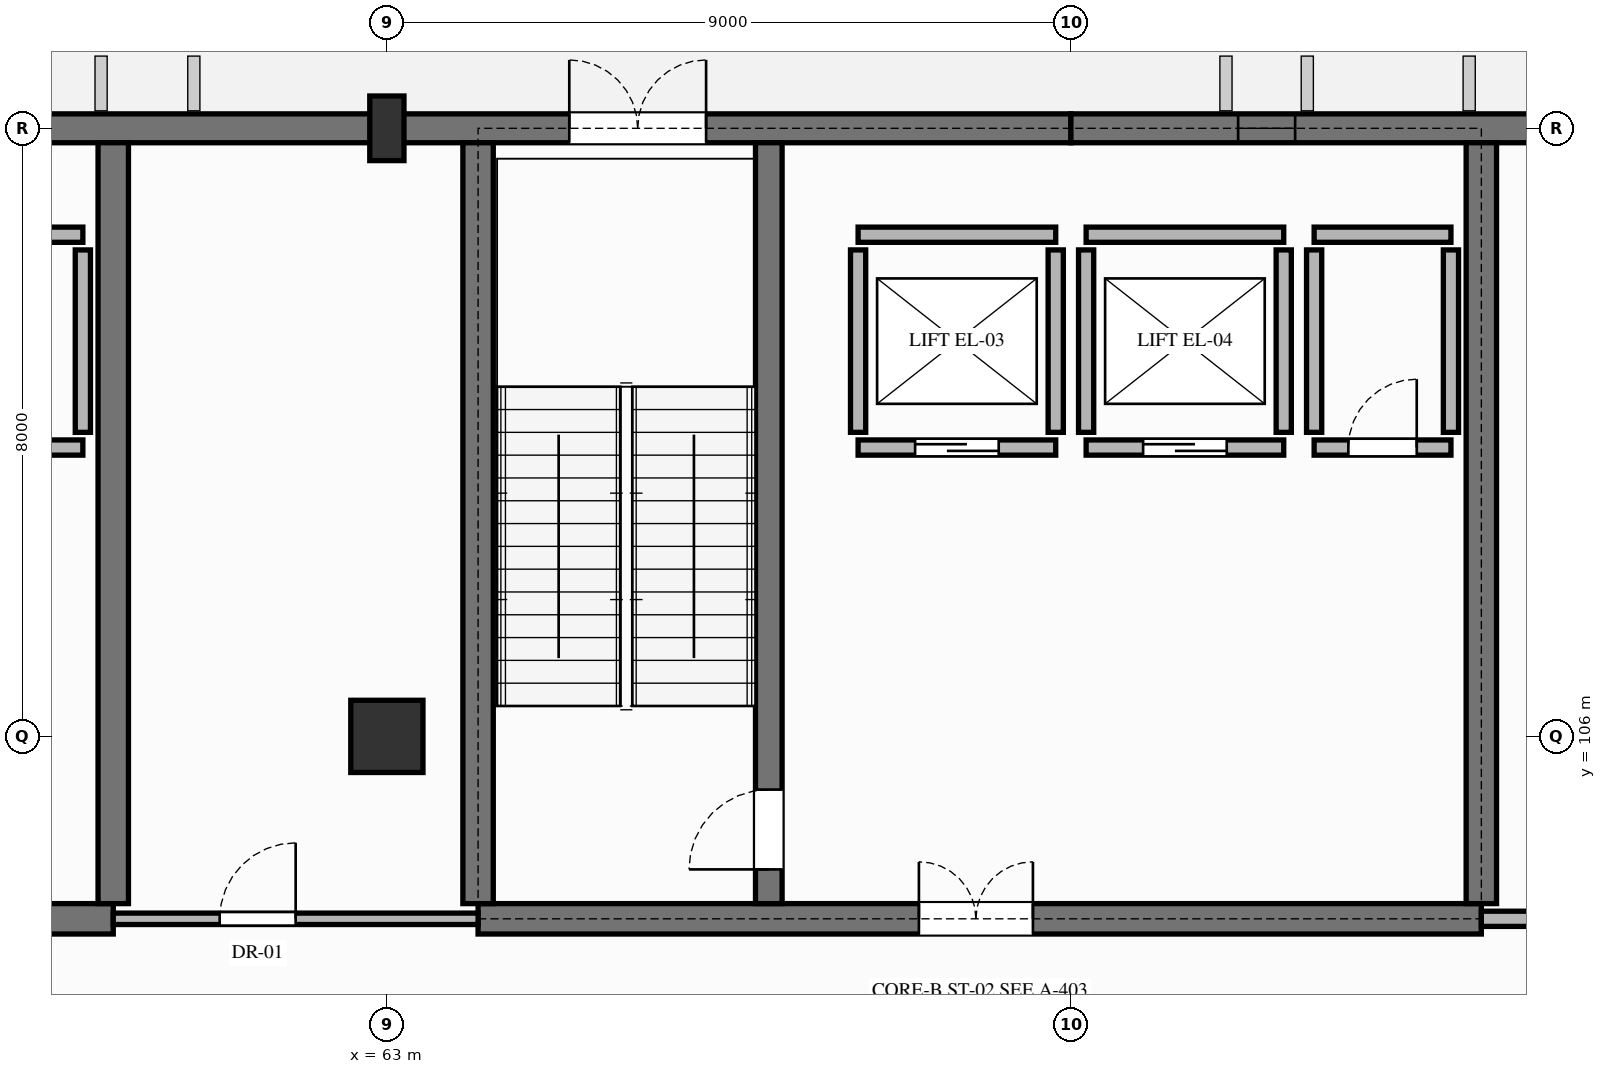
"""IFC4 building model, lengths in metres.
Left out: names, types, materials, properties, quantities, classifications, styles, units other than length and angle.
Written with IfcOpenShell. Run it as: python <this file> out.ifc"""

import sys

from ifc_helpers import new_model, si_unit, direction, frame, frame_2d, origin, origin_2d, place, context, subcontext, project, spatial, rectangle, extrude, element, fill, save


model = new_model("IFC4")
c1 = context("Model", 3, precision=1e-05, world=origin(), true_north=direction((0.0, 1.0)))
c2 = subcontext(c1, "Body", "Model", "MODEL_VIEW")
j1 = project(units=[si_unit("LENGTHUNIT", "METRE"), si_unit("PLANEANGLEUNIT", "RADIAN")], contexts=[c1])
p1 = place(None, origin())
s1 = spatial("IfcSite", under=j1, at=p1, CompositionType="ELEMENT")
p2 = place(p1, origin())
s2 = spatial("IfcBuilding", under=s1, at=p2, CompositionType="ELEMENT")
p3 = place(p2, origin())
s3 = spatial("IfcBuildingStorey", under=s2, at=p3, CompositionType="ELEMENT", Elevation=0.0)
p4 = place(p3, frame((63.0, 106.0, 0.0), z_axis=(0.0, 0.0, 1.0), x_axis=(1.0, 0.0, 0.0)))
e1 = element("IfcColumn", 1, at=p4, inside=s3, PredefinedType="COLUMN", context=c2, shape_type="SweptSolid", body=[
    extrude(rectangle(XDim=0.95, YDim=0.95, at=origin_2d()), origin(), (0.0, 0.0, 1.0), 5.1),
])
p5 = place(p3, frame((63.0, 114.0, 0.0), z_axis=(0.0, 0.0, 1.0), x_axis=(0.0, 1.0, 0.0)))
e2 = element("IfcColumn", 2, at=p5, inside=s3, PredefinedType="COLUMN", context=c2, shape_type="SweptSolid", body=[
    extrude(rectangle(XDim=0.45, YDim=0.85, at=origin_2d()), origin(), (0.0, 0.0, 1.0), 5.1),
])
p6 = place(p3, frame((54.0, 114.0, 0.0), z_axis=(0.0, 0.0, 1.0), x_axis=(1.0, 0.0, 0.0)))
e3 = element("IfcWall", 3, at=p6, inside=s3, PredefinedType="SOLIDWALL", context=c2, shape_type="SweptSolid", body=[
    extrude(rectangle(XDim=9.0, YDim=0.38, at=frame_2d((4.5, 0.0))), origin(), (0.0, 0.0, 1.0), 4.8),
])
p7 = place(p6, frame((2.2, 0.0, 1.15)))
e4 = element("IfcOpeningElement", 4, at=p7, cuts=e3, PredefinedType="OPENING", context=c2, shape_type="SweptSolid", body=[
    extrude(rectangle(XDim=0.75, YDim=2.2, at=frame_2d((0.375, 1.1))), frame((0.0, 0.2, 0.0), z_axis=(0.0, -1.0, 0.0), x_axis=(1.0, 0.0, 0.0)), (0.0, 0.0, 1.0), 0.4),
])
p8 = place(p3, frame((63.0, 114.0, 0.0), z_axis=(0.0, 0.0, 1.0), x_axis=(1.0, 0.0, 0.0)))
e5 = element("IfcWall", 5, at=p8, inside=s3, PredefinedType="SOLIDWALL", context=c2, shape_type="SweptSolid", body=[
    extrude(rectangle(XDim=9.0, YDim=0.38, at=frame_2d((4.5, 0.0))), origin(), (0.0, 0.0, 1.0), 4.8),
])
p9 = place(p8, frame((2.4, 0.0, 0.0)))
e6 = element("IfcOpeningElement", 6, at=p9, cuts=e5, PredefinedType="OPENING", context=c2, shape_type="SweptSolid", body=[
    extrude(rectangle(XDim=1.8, YDim=2.4, at=frame_2d((0.9, 1.2))), frame((0.0, 0.2, 0.0), z_axis=(0.0, -1.0, 0.0), x_axis=(1.0, 0.0, 0.0)), (0.0, 0.0, 1.0), 0.4),
])
p10 = place(p3, frame((72.0, 114.0, 0.0), z_axis=(0.0, 0.0, 1.0), x_axis=(1.0, 0.0, 0.0)))
e7 = element("IfcWall", 7, at=p10, inside=s3, PredefinedType="SOLIDWALL", context=c2, shape_type="SweptSolid", body=[
    extrude(rectangle(XDim=9.0, YDim=0.38, at=frame_2d((4.5, 0.0))), origin(), (0.0, 0.0, 1.0), 4.8),
])
p11 = place(p10, frame((2.2, 0.0, 1.15)))
e8 = element("IfcOpeningElement", 8, at=p11, cuts=e7, PredefinedType="OPENING", context=c2, shape_type="SweptSolid", body=[
    extrude(rectangle(XDim=0.75, YDim=2.2, at=frame_2d((0.375, 1.1))), frame((0.0, 0.2, 0.0), z_axis=(0.0, -1.0, 0.0), x_axis=(1.0, 0.0, 0.0)), (0.0, 0.0, 1.0), 0.4),
])
p12 = place(p3, frame((46.2, 103.6, 0.0), z_axis=(0.0, 0.0, 1.0), x_axis=(1.0, 0.0, 0.0)))
e9 = element("IfcWall", 9, at=p12, inside=s3, PredefinedType="SHEAR", context=c2, shape_type="SweptSolid", body=[
    extrude(rectangle(XDim=13.2, YDim=0.4, at=frame_2d((6.6, 0.0))), origin(), (0.0, 0.0, 1.0), 4.8),
])
p13 = place(p12, frame((5.8, 0.0, 0.0)))
e10 = element("IfcOpeningElement", 10, at=p13, cuts=e9, PredefinedType="OPENING", context=c2, shape_type="SweptSolid", body=[
    extrude(rectangle(XDim=1.5, YDim=2.2, at=frame_2d((0.75, 1.1))), frame((0.0, 0.21, 0.0), z_axis=(0.0, -1.0, 0.0), x_axis=(1.0, 0.0, 0.0)), (0.0, 0.0, 1.0), 0.42),
])
p14 = place(p3, frame((59.4, 103.8, 0.0), z_axis=(0.0, 0.0, 1.0), x_axis=(0.0, 1.0, 0.0)))
e11 = element("IfcWall", 11, at=p14, inside=s3, PredefinedType="SHEAR", context=c2, shape_type="SweptSolid", body=[
    extrude(rectangle(XDim=10.01, YDim=0.4, at=frame_2d((5.005, 0.0))), origin(), (0.0, 0.0, 1.0), 4.8),
])
p15 = place(p3, frame((57.2, 109.8, 0.0), z_axis=(0.0, 0.0, 1.0), x_axis=(1.0, 0.0, 0.0)))
e12 = element("IfcWall", 12, at=p15, inside=s3, PredefinedType="PARTITIONING", context=c2, shape_type="SweptSolid", body=[
    extrude(rectangle(XDim=1.8, YDim=0.2, at=frame_2d((0.9, 0.0))), origin(), (0.0, 0.0, 1.0), 4.8),
])
p16 = place(p15, frame((0.45, 0.0, 0.0)))
e13 = element("IfcOpeningElement", 13, at=p16, cuts=e12, PredefinedType="OPENING", context=c2, shape_type="SweptSolid", body=[
    extrude(rectangle(XDim=0.9, YDim=2.1, at=frame_2d((0.45, 1.05))), frame((0.0, 0.11, 0.0), z_axis=(0.0, -1.0, 0.0), x_axis=(1.0, 0.0, 0.0)), (0.0, 0.0, 1.0), 0.22),
])
p17 = place(p3, frame((57.2, 112.6, 0.0), z_axis=(0.0, 0.0, 1.0), x_axis=(1.0, 0.0, 0.0)))
e14 = element("IfcWall", 14, at=p17, inside=s3, PredefinedType="PARTITIONING", context=c2, shape_type="SweptSolid", body=[
    extrude(rectangle(XDim=1.8, YDim=0.2, at=frame_2d((0.9, 0.0))), origin(), (0.0, 0.0, 1.0), 4.8),
])
p18 = place(p3, frame((59.0, 110.0, 0.0), z_axis=(0.0, 0.0, 1.0), x_axis=(0.0, 1.0, 0.0)))
e15 = element("IfcWall", 15, at=p18, inside=s3, PredefinedType="PARTITIONING", context=c2, shape_type="SweptSolid", body=[
    extrude(rectangle(XDim=2.4, YDim=0.2, at=frame_2d((1.2, 0.0))), origin(), (0.0, 0.0, 1.0), 4.8),
])
p19 = place(p3, frame((64.2, 103.6, 0.0), z_axis=(0.0, 0.0, 1.0), x_axis=(1.0, 0.0, 0.0)))
e16 = element("IfcWall", 16, at=p19, inside=s3, PredefinedType="SHEAR", context=c2, shape_type="SweptSolid", body=[
    extrude(rectangle(XDim=13.2, YDim=0.4, at=frame_2d((6.6, 0.0))), origin(), (0.0, 0.0, 1.0), 4.8),
])
p20 = place(p19, frame((5.8, 0.0, 0.0)))
e17 = element("IfcOpeningElement", 17, at=p20, cuts=e16, PredefinedType="OPENING", context=c2, shape_type="SweptSolid", body=[
    extrude(rectangle(XDim=1.5, YDim=2.2, at=frame_2d((0.75, 1.1))), frame((0.0, 0.21, 0.0), z_axis=(0.0, -1.0, 0.0), x_axis=(1.0, 0.0, 0.0)), (0.0, 0.0, 1.0), 0.42),
])
for number, where, z_axis, x_axis in (
    (18, (64.2, 103.8, 0.0), (0.0, 0.0, 1.0), (0.0, 1.0, 0.0)),
    (19, (77.4, 103.8, 0.0), (0.0, 0.0, 1.0), (0.0, 1.0, 0.0)),
):
    element("IfcWall", number, at=place(p3, frame(where, z_axis=z_axis, x_axis=x_axis)), inside=s3, PredefinedType="SHEAR", context=c2, shape_type="SweptSolid", body=[
        extrude(rectangle(XDim=10.01, YDim=0.4, at=frame_2d((5.005, 0.0))), origin(), (0.0, 0.0, 1.0), 4.8),
    ])
p21 = place(p3, frame((68.025, 103.8, 0.0), z_axis=(0.0, 0.0, 1.0), x_axis=(0.0, 1.0, 0.0)))
e20 = element("IfcWall", 20, at=p21, inside=s3, PredefinedType="SHEAR", context=c2, shape_type="SweptSolid", body=[
    extrude(rectangle(XDim=10.01, YDim=0.35, at=frame_2d((5.005, 0.0))), origin(), (0.0, 0.0, 1.0), 4.8),
])
p22 = place(p21, frame((0.45, 0.0, 0.0)))
e21 = element("IfcOpeningElement", 21, at=p22, cuts=e20, PredefinedType="OPENING", context=c2, shape_type="SweptSolid", body=[
    extrude(rectangle(XDim=1.05, YDim=2.2, at=frame_2d((0.525, 1.1))), frame((0.0, 0.185, 0.0), z_axis=(0.0, -1.0, 0.0), x_axis=(1.0, 0.0, 0.0)), (0.0, 0.0, 1.0), 0.37),
])
p23 = place(p3, frame((69.2, 109.8, 0.0), z_axis=(0.0, 0.0, 1.0), x_axis=(1.0, 0.0, 0.0)))
e22 = element("IfcWall", 22, at=p23, inside=s3, PredefinedType="PARTITIONING", context=c2, shape_type="SweptSolid", body=[
    extrude(rectangle(XDim=2.6, YDim=0.2, at=frame_2d((1.3, 0.0))), origin(), (0.0, 0.0, 1.0), 4.8),
])
p24 = place(p23, frame((0.75, 0.0, 0.0)))
e23 = element("IfcOpeningElement", 23, at=p24, cuts=e22, PredefinedType="OPENING", context=c2, shape_type="SweptSolid", body=[
    extrude(rectangle(XDim=1.1, YDim=2.15, at=frame_2d((0.55, 1.075))), frame((0.0, 0.11, 0.0), z_axis=(0.0, -1.0, 0.0), x_axis=(1.0, 0.0, 0.0)), (0.0, 0.0, 1.0), 0.22),
])
p25 = place(p3, frame((69.2, 112.6, 0.0), z_axis=(0.0, 0.0, 1.0), x_axis=(1.0, 0.0, 0.0)))
e24 = element("IfcWall", 24, at=p25, inside=s3, PredefinedType="PARTITIONING", context=c2, shape_type="SweptSolid", body=[
    extrude(rectangle(XDim=2.6, YDim=0.2, at=frame_2d((1.3, 0.0))), origin(), (0.0, 0.0, 1.0), 4.8),
])
for number, where, z_axis, x_axis in (
    (25, (69.2, 110.0, 0.0), (0.0, 0.0, 1.0), (0.0, 1.0, 0.0)),
    (26, (71.8, 110.0, 0.0), (0.0, 0.0, 1.0), (0.0, 1.0, 0.0)),
):
    element("IfcWall", number, at=place(p3, frame(where, z_axis=z_axis, x_axis=x_axis)), inside=s3, PredefinedType="PARTITIONING", context=c2, shape_type="SweptSolid", body=[
        extrude(rectangle(XDim=2.4, YDim=0.2, at=frame_2d((1.2, 0.0))), origin(), (0.0, 0.0, 1.0), 4.8),
    ])
p26 = place(p3, frame((72.2, 109.8, 0.0), z_axis=(0.0, 0.0, 1.0), x_axis=(1.0, 0.0, 0.0)))
e27 = element("IfcWall", 27, at=p26, inside=s3, PredefinedType="PARTITIONING", context=c2, shape_type="SweptSolid", body=[
    extrude(rectangle(XDim=2.6, YDim=0.2, at=frame_2d((1.3, 0.0))), origin(), (0.0, 0.0, 1.0), 4.8),
])
p27 = place(p26, frame((0.75, 0.0, 0.0)))
e28 = element("IfcOpeningElement", 28, at=p27, cuts=e27, PredefinedType="OPENING", context=c2, shape_type="SweptSolid", body=[
    extrude(rectangle(XDim=1.1, YDim=2.15, at=frame_2d((0.55, 1.075))), frame((0.0, 0.11, 0.0), z_axis=(0.0, -1.0, 0.0), x_axis=(1.0, 0.0, 0.0)), (0.0, 0.0, 1.0), 0.22),
])
p28 = place(p3, frame((72.2, 112.6, 0.0), z_axis=(0.0, 0.0, 1.0), x_axis=(1.0, 0.0, 0.0)))
e29 = element("IfcWall", 29, at=p28, inside=s3, PredefinedType="PARTITIONING", context=c2, shape_type="SweptSolid", body=[
    extrude(rectangle(XDim=2.6, YDim=0.2, at=frame_2d((1.3, 0.0))), origin(), (0.0, 0.0, 1.0), 4.8),
])
for number, where, z_axis, x_axis in (
    (30, (72.2, 110.0, 0.0), (0.0, 0.0, 1.0), (0.0, 1.0, 0.0)),
    (31, (74.8, 110.0, 0.0), (0.0, 0.0, 1.0), (0.0, 1.0, 0.0)),
):
    element("IfcWall", number, at=place(p3, frame(where, z_axis=z_axis, x_axis=x_axis)), inside=s3, PredefinedType="PARTITIONING", context=c2, shape_type="SweptSolid", body=[
        extrude(rectangle(XDim=2.4, YDim=0.2, at=frame_2d((1.2, 0.0))), origin(), (0.0, 0.0, 1.0), 4.8),
    ])
p29 = place(p3, frame((75.2, 109.8, 0.0), z_axis=(0.0, 0.0, 1.0), x_axis=(1.0, 0.0, 0.0)))
e32 = element("IfcWall", 32, at=p29, inside=s3, PredefinedType="PARTITIONING", context=c2, shape_type="SweptSolid", body=[
    extrude(rectangle(XDim=1.8, YDim=0.2, at=frame_2d((0.9, 0.0))), origin(), (0.0, 0.0, 1.0), 4.8),
])
p30 = place(p29, frame((0.45, 0.0, 0.0)))
e33 = element("IfcOpeningElement", 33, at=p30, cuts=e32, PredefinedType="OPENING", context=c2, shape_type="SweptSolid", body=[
    extrude(rectangle(XDim=0.9, YDim=2.1, at=frame_2d((0.45, 1.05))), frame((0.0, 0.11, 0.0), z_axis=(0.0, -1.0, 0.0), x_axis=(1.0, 0.0, 0.0)), (0.0, 0.0, 1.0), 0.22),
])
p31 = place(p3, frame((75.2, 112.6, 0.0), z_axis=(0.0, 0.0, 1.0), x_axis=(1.0, 0.0, 0.0)))
e34 = element("IfcWall", 34, at=p31, inside=s3, PredefinedType="PARTITIONING", context=c2, shape_type="SweptSolid", body=[
    extrude(rectangle(XDim=1.8, YDim=0.2, at=frame_2d((0.9, 0.0))), origin(), (0.0, 0.0, 1.0), 4.8),
])
for number, where, z_axis, x_axis in (
    (35, (75.2, 110.0, 0.0), (0.0, 0.0, 1.0), (0.0, 1.0, 0.0)),
    (36, (77.0, 110.0, 0.0), (0.0, 0.0, 1.0), (0.0, 1.0, 0.0)),
):
    element("IfcWall", number, at=place(p3, frame(where, z_axis=z_axis, x_axis=x_axis)), inside=s3, PredefinedType="PARTITIONING", context=c2, shape_type="SweptSolid", body=[
        extrude(rectangle(XDim=2.4, YDim=0.2, at=frame_2d((1.2, 0.0))), origin(), (0.0, 0.0, 1.0), 4.8),
    ])
p32 = place(p3, frame((59.4, 103.6, 0.0), z_axis=(0.0, 0.0, 1.0), x_axis=(1.0, 0.0, 0.0)))
e37 = element("IfcWall", 37, at=p32, inside=s3, PredefinedType="PARTITIONING", context=c2, shape_type="SweptSolid", body=[
    extrude(rectangle(XDim=4.8, YDim=0.15, at=frame_2d((2.4, 0.0))), origin(), (0.0, 0.0, 1.0), 4.8),
])
p33 = place(p32, frame((1.4, 0.0, 0.0)))
e38 = element("IfcOpeningElement", 38, at=p33, cuts=e37, PredefinedType="OPENING", context=c2, shape_type="SweptSolid", body=[
    extrude(rectangle(XDim=1.0, YDim=2.15, at=frame_2d((0.5, 1.075))), frame((0.0, 0.085, 0.0), z_axis=(0.0, -1.0, 0.0), x_axis=(1.0, 0.0, 0.0)), (0.0, 0.0, 1.0), 0.17),
])
p34 = place(p3, frame((77.4, 103.6, 0.0), z_axis=(0.0, 0.0, 1.0), x_axis=(1.0, 0.0, 0.0)))
e39 = element("IfcWall", 39, at=p34, inside=s3, PredefinedType="PARTITIONING", context=c2, shape_type="SweptSolid", body=[
    extrude(rectangle(XDim=21.6, YDim=0.2, at=frame_2d((10.8, 0.0))), origin(), (0.0, 0.0, 1.0), 4.8),
])
p35 = place(p34, frame((9.9, 0.0, 0.0)))
e40 = element("IfcOpeningElement", 40, at=p35, cuts=e39, PredefinedType="OPENING", context=c2, shape_type="SweptSolid", body=[
    extrude(rectangle(XDim=1.6, YDim=2.2, at=frame_2d((0.8, 1.1))), frame((0.0, 0.11, 0.0), z_axis=(0.0, -1.0, 0.0), x_axis=(1.0, 0.0, 0.0)), (0.0, 0.0, 1.0), 0.22),
])
p36 = place(p9, origin())
e41 = element("IfcDoor", 41, at=p36, inside=s3, OperationType="DOUBLE_DOOR_SINGLE_SWING", PredefinedType="DOOR", context=c2, shape_type="SweptSolid", body=[
    extrude(rectangle(XDim=1.8, YDim=2.4, at=frame_2d((0.9, 1.2))), frame((0.0, 0.025, 0.0), z_axis=(0.0, -1.0, 0.0), x_axis=(1.0, 0.0, 0.0)), (0.0, 0.0, 1.0), 0.05),
])
fill(e6, e41)
p37 = place(p11, origin())
e42 = element("IfcWindow", 42, at=p37, inside=s3, PartitioningType="SINGLE_PANEL", PredefinedType="WINDOW", context=c2, shape_type="SweptSolid", body=[
    extrude(rectangle(XDim=0.75, YDim=2.2, at=frame_2d((0.375, 1.1))), frame((0.0, 0.03, 0.0), z_axis=(0.0, -1.0, 0.0), x_axis=(1.0, 0.0, 0.0)), (0.0, 0.0, 1.0), 0.06),
])
fill(e8, e42)
p38 = place(p20, origin())
e43 = element("IfcDoor", 43, at=p38, inside=s3, OperationType="DOUBLE_DOOR_SINGLE_SWING", PredefinedType="DOOR", context=c2, shape_type="SweptSolid", body=[
    extrude(rectangle(XDim=1.5, YDim=2.2, at=frame_2d((0.75, 1.1))), frame((0.0, 0.025, 0.0), z_axis=(0.0, -1.0, 0.0), x_axis=(1.0, 0.0, 0.0)), (0.0, 0.0, 1.0), 0.05),
])
fill(e17, e43)
p39 = place(p22, origin())
e44 = element("IfcDoor", 44, at=p39, inside=s3, OperationType="SINGLE_SWING_LEFT", PredefinedType="DOOR", context=c2, shape_type="SweptSolid", body=[
    extrude(rectangle(XDim=1.05, YDim=2.2, at=frame_2d((0.525, 1.1))), frame((0.0, 0.025, 0.0), z_axis=(0.0, -1.0, 0.0), x_axis=(1.0, 0.0, 0.0)), (0.0, 0.0, 1.0), 0.05),
])
fill(e21, e44)
p40 = place(p24, origin())
e45 = element("IfcDoor", 45, at=p40, inside=s3, OperationType="SLIDING_TO_LEFT", PredefinedType="DOOR", context=c2, shape_type="SweptSolid", body=[
    extrude(rectangle(XDim=1.1, YDim=2.15, at=frame_2d((0.55, 1.075))), frame((0.0, 0.025, 0.0), z_axis=(0.0, -1.0, 0.0), x_axis=(1.0, 0.0, 0.0)), (0.0, 0.0, 1.0), 0.05),
])
fill(e23, e45)
p41 = place(p27, origin())
e46 = element("IfcDoor", 46, at=p41, inside=s3, OperationType="SLIDING_TO_RIGHT", PredefinedType="DOOR", context=c2, shape_type="SweptSolid", body=[
    extrude(rectangle(XDim=1.1, YDim=2.15, at=frame_2d((0.55, 1.075))), frame((0.0, 0.025, 0.0), z_axis=(0.0, -1.0, 0.0), x_axis=(1.0, 0.0, 0.0)), (0.0, 0.0, 1.0), 0.05),
])
fill(e28, e46)
p42 = place(p30, origin())
e47 = element("IfcDoor", 47, at=p42, inside=s3, OperationType="SINGLE_SWING_RIGHT", PredefinedType="DOOR", context=c2, shape_type="SweptSolid", body=[
    extrude(rectangle(XDim=0.9, YDim=2.1, at=frame_2d((0.45, 1.05))), frame((0.0, 0.025, 0.0), z_axis=(0.0, -1.0, 0.0), x_axis=(1.0, 0.0, 0.0)), (0.0, 0.0, 1.0), 0.05),
])
fill(e33, e47)
p43 = place(p33, origin())
e48 = element("IfcDoor", 48, at=p43, inside=s3, OperationType="SINGLE_SWING_RIGHT", PredefinedType="DOOR", context=c2, shape_type="SweptSolid", body=[
    extrude(rectangle(XDim=1.0, YDim=2.15, at=frame_2d((0.5, 1.075))), frame((0.0, 0.025, 0.0), z_axis=(0.0, -1.0, 0.0), x_axis=(1.0, 0.0, 0.0)), (0.0, 0.0, 1.0), 0.05),
])
fill(e38, e48)
save(model, sys.argv[1])
